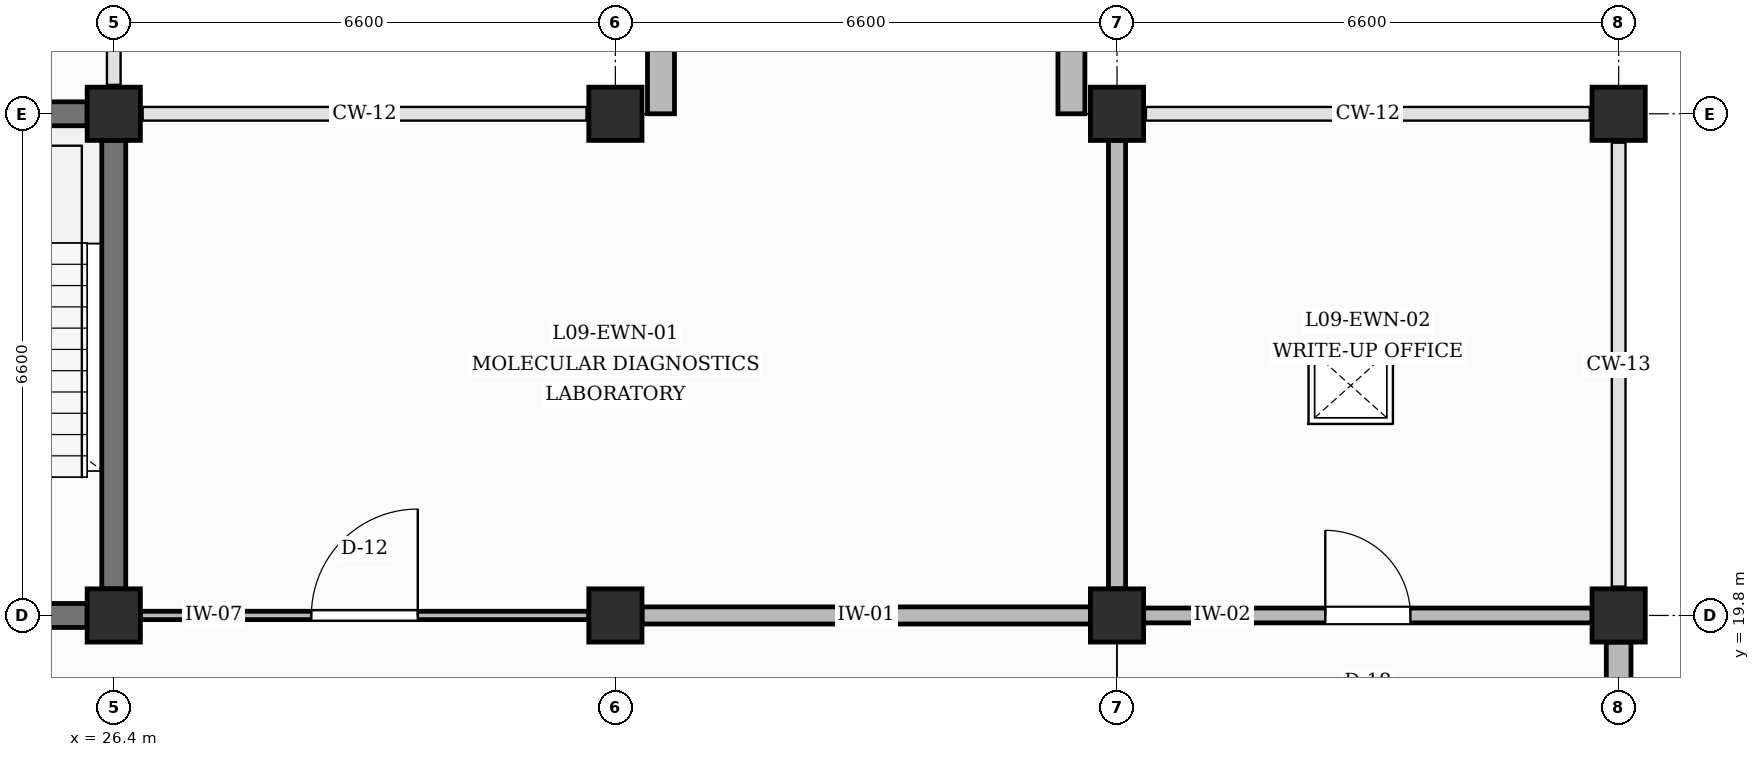
"""IFC4 building model, lengths in metres.
Left out: names, types, materials, properties, quantities, classifications, styles, units other than length and angle.
Written with IfcOpenShell. Run it as: python <this file> out.ifc"""

import sys

from ifc_helpers import new_model, si_unit, direction, frame, frame_2d, origin, origin_2d, place, context, subcontext, project, spatial, rectangle, extrude, element, fill, save


model = new_model("IFC4")
c1 = context("Model", 3, precision=1e-05, world=origin(), true_north=direction((0.0, 1.0)))
c2 = subcontext(c1, "Body", "Model", "MODEL_VIEW")
j1 = project(units=[si_unit("LENGTHUNIT", "METRE"), si_unit("PLANEANGLEUNIT", "RADIAN")], contexts=[c1])
p1 = place(None, origin())
s1 = spatial("IfcSite", under=j1, at=p1, CompositionType="ELEMENT")
p2 = place(p1, origin())
s2 = spatial("IfcBuilding", under=s1, at=p2, CompositionType="ELEMENT")
p3 = place(p2, frame((0.0, 0.0, 39.6)))
s3 = spatial("IfcBuildingStorey", under=s2, at=p3, CompositionType="ELEMENT", Elevation=39.6)
for number, where, z_axis, x_axis in (
    (1, (26.4, 19.8, 0.0), (0.0, 0.0, 1.0), (1.0, 0.0, 0.0)),
    (2, (26.4, 26.4, 0.0), (0.0, 0.0, 1.0), (1.0, 0.0, 0.0)),
    (3, (33.0, 19.8, 0.0), (0.0, 0.0, 1.0), (1.0, 0.0, 0.0)),
    (4, (33.0, 26.4, 0.0), (0.0, 0.0, 1.0), (1.0, 0.0, 0.0)),
    (5, (39.6, 19.8, 0.0), (0.0, 0.0, 1.0), (1.0, 0.0, 0.0)),
    (6, (39.6, 26.4, 0.0), (0.0, 0.0, 1.0), (1.0, 0.0, 0.0)),
    (7, (46.2, 19.8, 0.0), (0.0, 0.0, 1.0), (1.0, 0.0, 0.0)),
    (8, (46.2, 26.4, 0.0), (0.0, 0.0, 1.0), (1.0, 0.0, 0.0)),
):
    element("IfcColumn", number, at=place(p3, frame(where, z_axis=z_axis, x_axis=x_axis)), inside=s3, PredefinedType="COLUMN", context=c2, shape_type="SweptSolid", body=[
        extrude(rectangle(XDim=0.7, YDim=0.7, at=origin_2d()), origin(), (0.0, 0.0, 1.0), 4.2),
    ])
for number, where, z_axis, x_axis in (
    (9, (33.6, 26.4, 0.0), (0.0, 0.0, 1.0), (0.0, 1.0, 0.0)),
    (10, (39.0, 26.4, 0.0), (0.0, 0.0, 1.0), (0.0, 1.0, 0.0)),
):
    element("IfcWall", number, at=place(p3, frame(where, z_axis=z_axis, x_axis=x_axis)), inside=s3, PredefinedType="SOLIDWALL", context=c2, shape_type="SweptSolid", body=[
        extrude(rectangle(XDim=2.0, YDim=0.355, at=frame_2d((1.0, 0.0))), origin(), (0.0, 0.0, 1.0), 3.29),
    ])
p4 = place(p3, frame((46.2, 13.55, 0.0), z_axis=(0.0, 0.0, 1.0), x_axis=(0.0, 1.0, 0.0)))
e11 = element("IfcWall", 11, at=p4, inside=s3, PredefinedType="SOLIDWALL", context=c2, shape_type="SweptSolid", body=[
    extrude(rectangle(XDim=5.9, YDim=0.325, at=frame_2d((2.95, 0.0))), origin(), (0.0, 0.0, 1.0), 3.29),
])
p5 = place(p4, frame((2.19, 0.0, 0.95)))
e12 = element("IfcOpeningElement", 12, at=p5, cuts=e11, PredefinedType="OPENING", context=c2, shape_type="SweptSolid", body=[
    extrude(rectangle(XDim=1.52, YDim=1.74, at=frame_2d((0.76, 0.87))), frame((0.0, 0.172, 0.0), z_axis=(0.0, -1.0, 0.0), x_axis=(1.0, 0.0, 0.0)), (0.0, 0.0, 1.0), 0.345),
])
p6 = place(p3, frame((20.15, 19.8, 0.0), z_axis=(0.0, 0.0, 1.0), x_axis=(1.0, 0.0, 0.0)))
e13 = element("IfcWall", 13, at=p6, inside=s3, PredefinedType="SHEAR", context=c2, shape_type="SweptSolid", body=[
    extrude(rectangle(XDim=5.9, YDim=0.315, at=frame_2d((2.95, 0.0))), origin(), (0.0, 0.0, 1.0), 3.29),
])
p7 = place(p6, frame((2.4, 0.0, 0.0)))
e14 = element("IfcOpeningElement", 14, at=p7, cuts=e13, PredefinedType="OPENING", context=c2, shape_type="SweptSolid", body=[
    extrude(rectangle(XDim=1.1, YDim=2.15, at=frame_2d((0.55, 1.075))), frame((0.0, 0.167, 0.0), z_axis=(0.0, -1.0, 0.0), x_axis=(1.0, 0.0, 0.0)), (0.0, 0.0, 1.0), 0.335),
])
for number, where, z_axis, x_axis in (
    (15, (20.15, 26.4, 0.0), (0.0, 0.0, 1.0), (1.0, 0.0, 0.0)),
    (16, (26.4, 20.15, 0.0), (0.0, 0.0, 1.0), (0.0, 1.0, 0.0)),
):
    element("IfcWall", number, at=place(p3, frame(where, z_axis=z_axis, x_axis=x_axis)), inside=s3, PredefinedType="SHEAR", context=c2, shape_type="SweptSolid", body=[
        extrude(rectangle(XDim=5.9, YDim=0.315, at=frame_2d((2.95, 0.0))), origin(), (0.0, 0.0, 1.0), 3.29),
    ])
p8 = place(p3, frame((26.75, 19.8, 0.0), z_axis=(0.0, 0.0, 1.0), x_axis=(1.0, 0.0, 0.0)))
e17 = element("IfcWall", 17, at=p8, inside=s3, PredefinedType="PARTITIONING", context=c2, shape_type="SweptSolid", body=[
    extrude(rectangle(XDim=5.9, YDim=0.11, at=frame_2d((2.95, 0.0))), origin(), (0.0, 0.0, 1.0), 3.29),
])
p9 = place(p8, frame((2.25, 0.0, 0.0)))
e18 = element("IfcOpeningElement", 18, at=p9, cuts=e17, PredefinedType="OPENING", context=c2, shape_type="SweptSolid", body=[
    extrude(rectangle(XDim=1.4, YDim=2.25, at=frame_2d((0.7, 1.125))), frame((0.0, 0.065, 0.0), z_axis=(0.0, -1.0, 0.0), x_axis=(1.0, 0.0, 0.0)), (0.0, 0.0, 1.0), 0.13),
])
p10 = place(p3, frame((33.35, 19.8, 0.0), z_axis=(0.0, 0.0, 1.0), x_axis=(1.0, 0.0, 0.0)))
e19 = element("IfcWall", 19, at=p10, inside=s3, PredefinedType="PARTITIONING", context=c2, shape_type="SweptSolid", body=[
    extrude(rectangle(XDim=5.9, YDim=0.225, at=frame_2d((2.95, 0.0))), origin(), (0.0, 0.0, 1.0), 3.29),
])
p11 = place(p3, frame((39.6, 20.15, 0.0), z_axis=(0.0, 0.0, 1.0), x_axis=(0.0, 1.0, 0.0)))
e20 = element("IfcWall", 20, at=p11, inside=s3, PredefinedType="PARTITIONING", context=c2, shape_type="SweptSolid", body=[
    extrude(rectangle(XDim=5.9, YDim=0.225, at=frame_2d((2.95, 0.0))), origin(), (0.0, 0.0, 1.0), 3.44),
])
p12 = place(p3, frame((39.95, 19.8, 0.0), z_axis=(0.0, 0.0, 1.0), x_axis=(1.0, 0.0, 0.0)))
e21 = element("IfcWall", 21, at=p12, inside=s3, PredefinedType="PARTITIONING", context=c2, shape_type="SweptSolid", body=[
    extrude(rectangle(XDim=5.9, YDim=0.195, at=frame_2d((2.95, 0.0))), origin(), (0.0, 0.0, 1.0), 3.29),
])
p13 = place(p12, frame((2.39, 0.0, 0.0)))
e22 = element("IfcOpeningElement", 22, at=p13, cuts=e21, PredefinedType="OPENING", context=c2, shape_type="SweptSolid", body=[
    extrude(rectangle(XDim=1.12, YDim=2.2, at=frame_2d((0.56, 1.1))), frame((0.0, 0.107, 0.0), z_axis=(0.0, -1.0, 0.0), x_axis=(1.0, 0.0, 0.0)), (0.0, 0.0, 1.0), 0.215),
])
p14 = place(p9, origin())
e23 = element("IfcDoor", 23, at=p14, inside=s3, OperationType="SINGLE_SWING_RIGHT", PredefinedType="DOOR", context=c2, shape_type="SweptSolid", body=[
    extrude(rectangle(XDim=1.4, YDim=2.25, at=frame_2d((0.7, 1.125))), frame((0.0, 0.025, 0.0), z_axis=(0.0, -1.0, 0.0), x_axis=(1.0, 0.0, 0.0)), (0.0, 0.0, 1.0), 0.05),
])
fill(e18, e23)
p15 = place(p13, origin())
e24 = element("IfcDoor", 24, at=p15, inside=s3, OperationType="SINGLE_SWING_LEFT", PredefinedType="DOOR", context=c2, shape_type="SweptSolid", body=[
    extrude(rectangle(XDim=1.12, YDim=2.2, at=frame_2d((0.56, 1.1))), frame((0.0, 0.025, 0.0), z_axis=(0.0, -1.0, 0.0), x_axis=(1.0, 0.0, 0.0)), (0.0, 0.0, 1.0), 0.05),
])
fill(e22, e24)
save(model, sys.argv[1])
